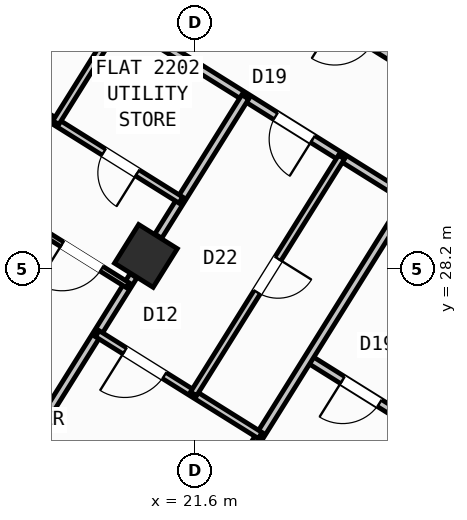
"""IFC4 building model, lengths in metres.
Left out: names, types, materials, properties, quantities, classifications, styles, units other than length and angle.
Written with IfcOpenShell. Run it as: python <this file> out.ifc"""

import sys

from ifc_helpers import new_model, si_unit, direction, frame, frame_2d, origin, origin_2d, place, context, subcontext, project, spatial, rectangle, hollow_rectangle, extrude, source, transform, mapped, element, fill, save


model = new_model("IFC4")
c1 = context("Model", 3, precision=1e-05, world=origin(), true_north=direction((0.0, 1.0)))
c2 = subcontext(c1, "Body", "Model", "MODEL_VIEW")
j1 = project(units=[si_unit("LENGTHUNIT", "METRE"), si_unit("PLANEANGLEUNIT", "RADIAN")], contexts=[c1])
p1 = place(None, origin())
s1 = spatial("IfcSite", under=j1, at=p1, CompositionType="ELEMENT")
p2 = place(p1, origin())
s2 = spatial("IfcBuilding", under=s1, at=p2, CompositionType="ELEMENT")
p3 = place(p2, frame((0.0, 0.0, 90.0)))
s3 = spatial("IfcBuildingStorey", under=s2, at=p3, CompositionType="ELEMENT", Elevation=90.0)
p4 = place(p3, frame((26.007, 24.976, 0.0), z_axis=(0.0, 0.0, 1.0), x_axis=(-0.529916319127, -0.848049936456, 0.0)))
e1 = element("IfcWall", 1, at=p4, inside=s3, PredefinedType="SHEAR", context=c2, shape_type="SweptSolid", body=[
    extrude(rectangle(XDim=6.375, YDim=0.65, at=frame_2d((3.188, 0.0))), origin(), (0.0, 0.0, 1.0), 3.35),
])
m1 = source(origin(), c2, "Body", "SweptSolid", [
    extrude(hollow_rectangle(XDim=0.9, YDim=0.9, WallThickness=0.036, at=origin_2d()), origin(), (0.0, 0.0, 1.0), 3.6),
])
p5 = place(p3, frame((20.632, 28.452, 0.0), z_axis=(0.0, 0.0, 1.0), x_axis=(-0.848048096156, 0.529919264233, 0.0)))
e2 = element("IfcColumn", 2, at=p5, inside=s3, PredefinedType="COLUMN", context=c2, shape_type="MappedRepresentation", body=[
    mapped(m1, transform((0.0, 0.0, 0.0), scale=1.0)),
])
p6 = place(p3, frame((31.76, 12.183, 0.0), z_axis=(0.0, 0.0, 1.0), x_axis=(-0.848047074256, 0.529920899612, 0.0)))
e3 = element("IfcWall", 3, at=p6, inside=s3, PredefinedType="STANDARD", context=c2, shape_type="SweptSolid", body=[
    extrude(rectangle(XDim=30.652, YDim=0.32, at=frame_2d((15.326, 0.0))), origin(), (0.0, 0.0, 1.0), 3.35),
])
p7 = place(p6, frame((15.153, 0.0, 0.0)))
e4 = element("IfcOpeningElement", 4, at=p7, cuts=e3, PredefinedType="OPENING", context=c2, shape_type="SweptSolid", body=[
    extrude(rectangle(XDim=1.2, YDim=2.15, at=frame_2d((0.6, 1.075))), frame((0.0, 0.17, 0.0), z_axis=(0.0, -1.0, 0.0), x_axis=(1.0, 0.0, 0.0)), (0.0, 0.0, 1.0), 0.34),
])
p8 = place(p6, frame((2.002, 0.0, 0.8)))
e5 = element("IfcOpeningElement", 5, at=p8, cuts=e3, PredefinedType="OPENING", context=c2, shape_type="SweptSolid", body=[
    extrude(rectangle(XDim=2.1, YDim=1.55, at=frame_2d((1.05, 0.775))), frame((0.0, 0.17, 0.0), z_axis=(0.0, -1.0, 0.0), x_axis=(1.0, 0.0, 0.0)), (0.0, 0.0, 1.0), 0.34),
])
p9 = place(p6, frame((7.206, 0.0, 0.8)))
e6 = element("IfcOpeningElement", 6, at=p9, cuts=e3, PredefinedType="OPENING", context=c2, shape_type="SweptSolid", body=[
    extrude(rectangle(XDim=2.1, YDim=1.55, at=frame_2d((1.05, 0.775))), frame((0.0, 0.17, 0.0), z_axis=(0.0, -1.0, 0.0), x_axis=(1.0, 0.0, 0.0)), (0.0, 0.0, 1.0), 0.34),
])
p10 = place(p6, frame((12.648, 0.0, 1.0)))
e7 = element("IfcOpeningElement", 7, at=p10, cuts=e3, PredefinedType="OPENING", context=c2, shape_type="SweptSolid", body=[
    extrude(rectangle(XDim=0.9, YDim=1.25, at=frame_2d((0.45, 0.625))), frame((0.0, 0.17, 0.0), z_axis=(0.0, -1.0, 0.0), x_axis=(1.0, 0.0, 0.0)), (0.0, 0.0, 1.0), 0.34),
])
p11 = place(p6, frame((27.974, 0.0, 0.95)))
e8 = element("IfcOpeningElement", 8, at=p11, cuts=e3, PredefinedType="OPENING", context=c2, shape_type="SweptSolid", body=[
    extrude(rectangle(XDim=1.2, YDim=1.4, at=frame_2d((0.6, 0.7))), frame((0.0, 0.17, 0.0), z_axis=(0.0, -1.0, 0.0), x_axis=(1.0, 0.0, 0.0)), (0.0, 0.0, 1.0), 0.34),
])
p12 = place(p6, frame((18.347, 0.0, 1.0)))
e9 = element("IfcOpeningElement", 9, at=p12, cuts=e3, PredefinedType="OPENING", context=c2, shape_type="SweptSolid", body=[
    extrude(rectangle(XDim=0.9, YDim=1.25, at=frame_2d((0.45, 0.625))), frame((0.0, 0.17, 0.0), z_axis=(0.0, -1.0, 0.0), x_axis=(1.0, 0.0, 0.0)), (0.0, 0.0, 1.0), 0.34),
])
p13 = place(p6, frame((20.931, 0.0, 1.0)))
e10 = element("IfcOpeningElement", 10, at=p13, cuts=e3, PredefinedType="OPENING", context=c2, shape_type="SweptSolid", body=[
    extrude(rectangle(XDim=0.65, YDim=1.15, at=frame_2d((0.325, 0.575))), frame((0.0, 0.17, 0.0), z_axis=(0.0, -1.0, 0.0), x_axis=(1.0, 0.0, 0.0)), (0.0, 0.0, 1.0), 0.34),
])
p14 = place(p6, frame((22.938, 0.0, 1.0)))
e11 = element("IfcOpeningElement", 11, at=p14, cuts=e3, PredefinedType="OPENING", context=c2, shape_type="SweptSolid", body=[
    extrude(rectangle(XDim=0.9, YDim=1.25, at=frame_2d((0.45, 0.625))), frame((0.0, 0.17, 0.0), z_axis=(0.0, -1.0, 0.0), x_axis=(1.0, 0.0, 0.0)), (0.0, 0.0, 1.0), 0.34),
])
p15 = place(p6, frame((25.069, 0.0, 1.0)))
e12 = element("IfcOpeningElement", 12, at=p15, cuts=e3, PredefinedType="OPENING", context=c2, shape_type="SweptSolid", body=[
    extrude(rectangle(XDim=0.9, YDim=1.25, at=frame_2d((0.45, 0.625))), frame((0.0, 0.17, 0.0), z_axis=(0.0, -1.0, 0.0), x_axis=(1.0, 0.0, 0.0)), (0.0, 0.0, 1.0), 0.34),
])
p16 = place(p3, frame((17.424, 47.083, 0.0), z_axis=(0.0, 0.0, 1.0), x_axis=(0.848049927979, -0.529916332693, 0.0)))
e13 = element("IfcWall", 13, at=p16, inside=s3, PredefinedType="STANDARD", context=c2, shape_type="SweptSolid", body=[
    extrude(rectangle(XDim=29.223, YDim=0.32, at=frame_2d((14.612, 0.0))), origin(), (0.0, 0.0, 1.0), 3.35),
])
p17 = place(p16, frame((15.02, 0.0, 0.0)))
e14 = element("IfcOpeningElement", 14, at=p17, cuts=e13, PredefinedType="OPENING", context=c2, shape_type="SweptSolid", body=[
    extrude(rectangle(XDim=1.05, YDim=2.15, at=frame_2d((0.525, 1.075))), frame((0.0, 0.17, 0.0), z_axis=(0.0, -1.0, 0.0), x_axis=(1.0, 0.0, 0.0)), (0.0, 0.0, 1.0), 0.34),
])
p18 = place(p16, frame((20.869, 0.0, 0.8)))
e15 = element("IfcOpeningElement", 15, at=p18, cuts=e13, PredefinedType="OPENING", context=c2, shape_type="SweptSolid", body=[
    extrude(rectangle(XDim=2.1, YDim=1.55, at=frame_2d((1.05, 0.775))), frame((0.0, 0.17, 0.0), z_axis=(0.0, -1.0, 0.0), x_axis=(1.0, 0.0, 0.0)), (0.0, 0.0, 1.0), 0.34),
])
p19 = place(p16, frame((25.438, 0.0, 0.8)))
e16 = element("IfcOpeningElement", 16, at=p19, cuts=e13, PredefinedType="OPENING", context=c2, shape_type="SweptSolid", body=[
    extrude(rectangle(XDim=2.1, YDim=1.55, at=frame_2d((1.05, 0.775))), frame((0.0, 0.17, 0.0), z_axis=(0.0, -1.0, 0.0), x_axis=(1.0, 0.0, 0.0)), (0.0, 0.0, 1.0), 0.34),
])
p20 = place(p16, frame((10.481, 0.0, 1.0)))
e17 = element("IfcOpeningElement", 17, at=p20, cuts=e13, PredefinedType="OPENING", context=c2, shape_type="SweptSolid", body=[
    extrude(rectangle(XDim=0.9, YDim=1.25, at=frame_2d((0.45, 0.625))), frame((0.0, 0.17, 0.0), z_axis=(0.0, -1.0, 0.0), x_axis=(1.0, 0.0, 0.0)), (0.0, 0.0, 1.0), 0.34),
])
p21 = place(p16, frame((6.674, 0.0, 1.0)))
e18 = element("IfcOpeningElement", 18, at=p21, cuts=e13, PredefinedType="OPENING", context=c2, shape_type="SweptSolid", body=[
    extrude(rectangle(XDim=0.9, YDim=1.25, at=frame_2d((0.45, 0.625))), frame((0.0, 0.17, 0.0), z_axis=(0.0, -1.0, 0.0), x_axis=(1.0, 0.0, 0.0)), (0.0, 0.0, 1.0), 0.34),
])
p22 = place(p16, frame((3.694, 0.0, 1.0)))
e19 = element("IfcOpeningElement", 19, at=p22, cuts=e13, PredefinedType="OPENING", context=c2, shape_type="SweptSolid", body=[
    extrude(rectangle(XDim=0.9, YDim=1.25, at=frame_2d((0.45, 0.625))), frame((0.0, 0.17, 0.0), z_axis=(0.0, -1.0, 0.0), x_axis=(1.0, 0.0, 0.0)), (0.0, 0.0, 1.0), 0.34),
])
p23 = place(p3, frame((26.049, 25.044, 0.0), z_axis=(0.0, 0.0, 1.0), x_axis=(-0.848050851465, 0.529914854792, 0.0)))
e20 = element("IfcWall", 20, at=p23, inside=s3, PredefinedType="PARTITIONING", context=c2, shape_type="SweptSolid", body=[
    extrude(rectangle(XDim=2.61, YDim=0.16, at=frame_2d((1.305, 0.0))), origin(), (0.0, 0.0, 1.0), 2.775),
])
p24 = place(p23, frame((0.95, 0.0, 0.0)))
e21 = element("IfcOpeningElement", 21, at=p24, cuts=e20, PredefinedType="OPENING", context=c2, shape_type="SweptSolid", body=[
    extrude(rectangle(XDim=0.86, YDim=2.05, at=frame_2d((0.43, 1.025))), frame((0.0, 0.09, 0.0), z_axis=(0.0, -1.0, 0.0), x_axis=(1.0, 0.0, 0.0)), (0.0, 0.0, 1.0), 0.18),
])
p25 = place(p3, frame((25.807, 29.582, 0.0), z_axis=(0.0, 0.0, 1.0), x_axis=(-0.529920357077, -0.848047413271, 0.0)))
e22 = element("IfcWall", 22, at=p25, inside=s3, PredefinedType="PARTITIONING", context=c2, shape_type="SweptSolid", body=[
    extrude(rectangle(XDim=11.45, YDim=0.16, at=frame_2d((5.725, 0.0))), origin(), (0.0, 0.0, 1.0), 3.34),
])
p26 = place(p3, frame((26.973, 31.447, 0.0), z_axis=(0.0, 0.0, 1.0), x_axis=(-0.848048310262, 0.529918921593, 0.0)))
e23 = element("IfcWall", 23, at=p26, inside=s3, PredefinedType="PARTITIONING", context=c2, shape_type="SweptSolid", body=[
    extrude(rectangle(XDim=16.73, YDim=0.16, at=frame_2d((8.365, 0.0))), origin(), (0.0, 0.0, 1.0), 3.34),
])
p27 = place(p26, frame((2.22, 0.0, 0.0)))
e24 = element("IfcOpeningElement", 24, at=p27, cuts=e23, PredefinedType="OPENING", context=c2, shape_type="SweptSolid", body=[
    extrude(rectangle(XDim=0.86, YDim=2.05, at=frame_2d((0.43, 1.025))), frame((0.0, 0.09, 0.0), z_axis=(0.0, -1.0, 0.0), x_axis=(1.0, 0.0, 0.0)), (0.0, 0.0, 1.0), 0.18),
])
p28 = place(p26, frame((5.28, 0.0, 0.0)))
e25 = element("IfcOpeningElement", 25, at=p28, cuts=e23, PredefinedType="OPENING", context=c2, shape_type="SweptSolid", body=[
    extrude(rectangle(XDim=1.0, YDim=2.1, at=frame_2d((0.5, 1.05))), frame((0.0, 0.09, 0.0), z_axis=(0.0, -1.0, 0.0), x_axis=(1.0, 0.0, 0.0)), (0.0, 0.0, 1.0), 0.18),
])
p29 = place(p3, frame((25.807, 29.582, 0.0), z_axis=(0.0, 0.0, 1.0), x_axis=(-0.848052408131, 0.529912363569, 0.0)))
e26 = element("IfcWall", 26, at=p29, inside=s3, PredefinedType="PARTITIONING", context=c2, shape_type="SweptSolid", body=[
    extrude(rectangle(XDim=16.73, YDim=0.16, at=frame_2d((8.365, 0.0))), origin(), (0.0, 0.0, 1.0), 3.34),
])
p30 = place(p29, frame((2.22, 0.0, 0.0)))
e27 = element("IfcOpeningElement", 27, at=p30, cuts=e26, PredefinedType="OPENING", context=c2, shape_type="SweptSolid", body=[
    extrude(rectangle(XDim=0.86, YDim=2.05, at=frame_2d((0.43, 1.025))), frame((0.0, 0.09, 0.0), z_axis=(0.0, -1.0, 0.0), x_axis=(1.0, 0.0, 0.0)), (0.0, 0.0, 1.0), 0.18),
])
p31 = place(p29, frame((14.013, 0.0, 0.0)))
e28 = element("IfcOpeningElement", 28, at=p31, cuts=e26, PredefinedType="OPENING", context=c2, shape_type="SweptSolid", body=[
    extrude(rectangle(XDim=1.0, YDim=2.1, at=frame_2d((0.5, 1.05))), frame((0.0, 0.09, 0.0), z_axis=(0.0, -1.0, 0.0), x_axis=(1.0, 0.0, 0.0)), (0.0, 0.0, 1.0), 0.18),
])
p32 = place(p3, frame((22.593, 31.59, 0.0), z_axis=(0.0, 0.0, 1.0), x_axis=(-0.529924383291, -0.848044897393, 0.0)))
e29 = element("IfcWall", 29, at=p32, inside=s3, PredefinedType="PARTITIONING", context=c2, shape_type="SweptSolid", body=[
    extrude(rectangle(XDim=3.238, YDim=0.16, at=frame_2d((1.619, 0.0))), origin(), (0.0, 0.0, 1.0), 2.775),
])
p33 = place(p3, frame((20.387, 28.06, 0.0), z_axis=(0.0, 0.0, 1.0), x_axis=(-0.529902564924, -0.848058530814, 0.0)))
e30 = element("IfcWall", 30, at=p33, inside=s3, PredefinedType="PARTITIONING", context=c2, shape_type="SweptSolid", body=[
    extrude(rectangle(XDim=6.376, YDim=0.16, at=frame_2d((3.188, 0.0))), origin(), (0.0, 0.0, 1.0), 2.775),
])
p34 = place(p3, frame((22.887, 24.909, 0.0), z_axis=(0.0, 0.0, 1.0), x_axis=(-0.84803087207, 0.529946827537, 0.0)))
e31 = element("IfcWall", 31, at=p34, inside=s3, PredefinedType="PLUMBINGWALL", context=c2, shape_type="SweptSolid", body=[
    extrude(rectangle(XDim=3.79, YDim=0.14, at=frame_2d((1.895, 0.0))), origin(), (0.0, 0.0, 1.0), 3.34),
])
p35 = place(p34, frame((2.23, 0.0, 0.0)))
e32 = element("IfcOpeningElement", 32, at=p35, cuts=e31, PredefinedType="OPENING", context=c2, shape_type="SweptSolid", body=[
    extrude(rectangle(XDim=0.92, YDim=2.08, at=frame_2d((0.46, 1.04))), frame((0.0, 0.08, 0.0), z_axis=(0.0, -1.0, 0.0), x_axis=(1.0, 0.0, 0.0)), (0.0, 0.0, 1.0), 0.16),
])
p36 = place(p3, frame((24.492, 30.403, 0.0), z_axis=(0.0, 0.0, 1.0), x_axis=(-0.529919283494, -0.848048084121, 0.0)))
e33 = element("IfcWall", 33, at=p36, inside=s3, PredefinedType="PLUMBINGWALL", context=c2, shape_type="SweptSolid", body=[
    extrude(rectangle(XDim=5.51, YDim=0.14, at=frame_2d((2.755, 0.0))), origin(), (0.0, 0.0, 1.0), 2.995),
])
p37 = place(p36, frame((2.365, 0.0, 0.0)))
e34 = element("IfcOpeningElement", 34, at=p37, cuts=e33, PredefinedType="OPENING", context=c2, shape_type="SweptSolid", body=[
    extrude(rectangle(XDim=0.78, YDim=2.05, at=frame_2d((0.39, 1.025))), frame((0.0, 0.08, 0.0), z_axis=(0.0, -1.0, 0.0), x_axis=(1.0, 0.0, 0.0)), (0.0, 0.0, 1.0), 0.16),
])
p38 = place(p3, frame((21.321, 29.554, 0.0), z_axis=(0.0, 0.0, 1.0), x_axis=(-0.84803529765, 0.529939745575, 0.0)))
e35 = element("IfcWall", 35, at=p38, inside=s3, PredefinedType="PLUMBINGWALL", context=c2, shape_type="SweptSolid", body=[
    extrude(rectangle(XDim=8.527, YDim=0.14, at=frame_2d((4.264, 0.0))), origin(), (0.0, 0.0, 1.0), 3.34),
])
p39 = place(p38, frame((5.155, 0.0, 0.0)))
e36 = element("IfcOpeningElement", 36, at=p39, cuts=e35, PredefinedType="OPENING", context=c2, shape_type="SweptSolid", body=[
    extrude(rectangle(XDim=0.78, YDim=2.05, at=frame_2d((0.39, 1.025))), frame((0.0, 0.08, 0.0), z_axis=(0.0, -1.0, 0.0), x_axis=(1.0, 0.0, 0.0)), (0.0, 0.0, 1.0), 0.16),
])
p40 = place(p38, frame((1.011, 0.0, 0.0)))
e37 = element("IfcOpeningElement", 37, at=p40, cuts=e35, PredefinedType="OPENING", context=c2, shape_type="SweptSolid", body=[
    extrude(rectangle(XDim=0.78, YDim=2.05, at=frame_2d((0.39, 1.025))), frame((0.0, 0.08, 0.0), z_axis=(0.0, -1.0, 0.0), x_axis=(1.0, 0.0, 0.0)), (0.0, 0.0, 1.0), 0.16),
])
p41 = place(p3, frame((20.132, 33.128, 0.0), z_axis=(0.0, 0.0, 1.0), x_axis=(-0.529935194983, -0.848038141311, 0.0)))
e38 = element("IfcWall", 38, at=p41, inside=s3, PredefinedType="PLUMBINGWALL", context=c2, shape_type="SweptSolid", body=[
    extrude(rectangle(XDim=2.41, YDim=0.14, at=frame_2d((1.205, 0.0))), origin(), (0.0, 0.0, 1.0), 3.34),
])
p42 = place(p3, frame((20.272, 27.875, 0.0), z_axis=(0.0, 0.0, 1.0), x_axis=(-0.848056204746, 0.529906287557, 0.0)))
e39 = element("IfcWall", 39, at=p42, inside=s3, PredefinedType="PARTITIONING", context=c2, shape_type="SweptSolid", body=[
    extrude(rectangle(XDim=8.527, YDim=0.11, at=frame_2d((4.264, 0.0))), origin(), (0.0, 0.0, 1.0), 3.34),
])
p43 = place(p42, frame((0.606, 0.0, 0.0)))
e40 = element("IfcOpeningElement", 40, at=p43, cuts=e39, PredefinedType="OPENING", context=c2, shape_type="SweptSolid", body=[
    extrude(rectangle(XDim=0.92, YDim=2.08, at=frame_2d((0.46, 1.04))), frame((0.0, 0.065, 0.0), z_axis=(0.0, -1.0, 0.0), x_axis=(1.0, 0.0, 0.0)), (0.0, 0.0, 1.0), 0.13),
])
p44 = place(p42, frame((2.738, 0.0, 0.0)))
e41 = element("IfcOpeningElement", 41, at=p44, cuts=e39, PredefinedType="OPENING", context=c2, shape_type="SweptSolid", body=[
    extrude(rectangle(XDim=0.92, YDim=2.08, at=frame_2d((0.46, 1.04))), frame((0.0, 0.065, 0.0), z_axis=(0.0, -1.0, 0.0), x_axis=(1.0, 0.0, 0.0)), (0.0, 0.0, 1.0), 0.13),
])
p45 = place(p42, frame((4.869, 0.0, 0.0)))
e42 = element("IfcOpeningElement", 42, at=p45, cuts=e39, PredefinedType="OPENING", context=c2, shape_type="SweptSolid", body=[
    extrude(rectangle(XDim=0.92, YDim=2.08, at=frame_2d((0.46, 1.04))), frame((0.0, 0.065, 0.0), z_axis=(0.0, -1.0, 0.0), x_axis=(1.0, 0.0, 0.0)), (0.0, 0.0, 1.0), 0.13),
])
p46 = place(p42, frame((7.001, 0.0, 0.0)))
e43 = element("IfcOpeningElement", 43, at=p46, cuts=e39, PredefinedType="OPENING", context=c2, shape_type="SweptSolid", body=[
    extrude(rectangle(XDim=0.92, YDim=2.08, at=frame_2d((0.46, 1.04))), frame((0.0, 0.065, 0.0), z_axis=(0.0, -1.0, 0.0), x_axis=(1.0, 0.0, 0.0)), (0.0, 0.0, 1.0), 0.13),
])
m2 = source(origin(), c2, "Body", "SweptSolid", [
    extrude(rectangle(XDim=0.86, YDim=2.05, at=frame_2d((0.43, 1.025))), frame((0.0, 0.025, 0.0), z_axis=(0.0, -1.0, 0.0), x_axis=(1.0, 0.0, 0.0)), (0.0, 0.0, 1.0), 0.05),
])
p47 = place(p24, origin())
e44 = element("IfcDoor", 44, at=p47, inside=s3, OperationType="SINGLE_SWING_RIGHT", PredefinedType="DOOR", context=c2, shape_type="MappedRepresentation", body=[
    mapped(m2, transform((0.0, 0.0, 0.0), scale=1.0)),
])
fill(e21, e44)
p48 = place(p30, origin())
e45 = element("IfcDoor", 45, at=p48, inside=s3, OperationType="SINGLE_SWING_LEFT", PredefinedType="DOOR", context=c2, shape_type="MappedRepresentation", body=[
    mapped(m2, transform((0.0, 0.0, 0.0), scale=1.0)),
])
fill(e27, e45)
m3 = source(origin(), c2, "Body", "SweptSolid", [
    extrude(rectangle(XDim=0.92, YDim=2.08, at=frame_2d((0.46, 1.04))), frame((0.0, 0.025, 0.0), z_axis=(0.0, -1.0, 0.0), x_axis=(1.0, 0.0, 0.0)), (0.0, 0.0, 1.0), 0.05),
])
p49 = place(p35, origin())
e46 = element("IfcDoor", 46, at=p49, inside=s3, OperationType="SINGLE_SWING_RIGHT", PredefinedType="DOOR", context=c2, shape_type="MappedRepresentation", body=[
    mapped(m3, transform((0.0, 0.0, 0.0), scale=1.0)),
])
fill(e32, e46)
m4 = source(origin(), c2, "Body", "SweptSolid", [
    extrude(rectangle(XDim=0.78, YDim=2.05, at=frame_2d((0.39, 1.025))), frame((0.0, 0.025, 0.0), z_axis=(0.0, -1.0, 0.0), x_axis=(1.0, 0.0, 0.0)), (0.0, 0.0, 1.0), 0.05),
])
p50 = place(p37, origin())
e47 = element("IfcDoor", 47, at=p50, inside=s3, OperationType="SINGLE_SWING_LEFT", PredefinedType="DOOR", context=c2, shape_type="MappedRepresentation", body=[
    mapped(m4, transform((0.0, 0.0, 0.0), scale=1.0)),
])
fill(e34, e47)
p51 = place(p40, origin())
e48 = element("IfcDoor", 48, at=p51, inside=s3, OperationType="SINGLE_SWING_LEFT", PredefinedType="DOOR", context=c2, shape_type="MappedRepresentation", body=[
    mapped(m4, transform((0.0, 0.0, 0.0), scale=1.0)),
])
fill(e37, e48)
p52 = place(p43, origin())
e49 = element("IfcDoor", 49, at=p52, inside=s3, OperationType="SINGLE_SWING_RIGHT", PredefinedType="DOOR", context=c2, shape_type="MappedRepresentation", body=[
    mapped(m3, transform((0.0, 0.0, 0.0), scale=1.0)),
])
fill(e40, e49)
save(model, sys.argv[1])
